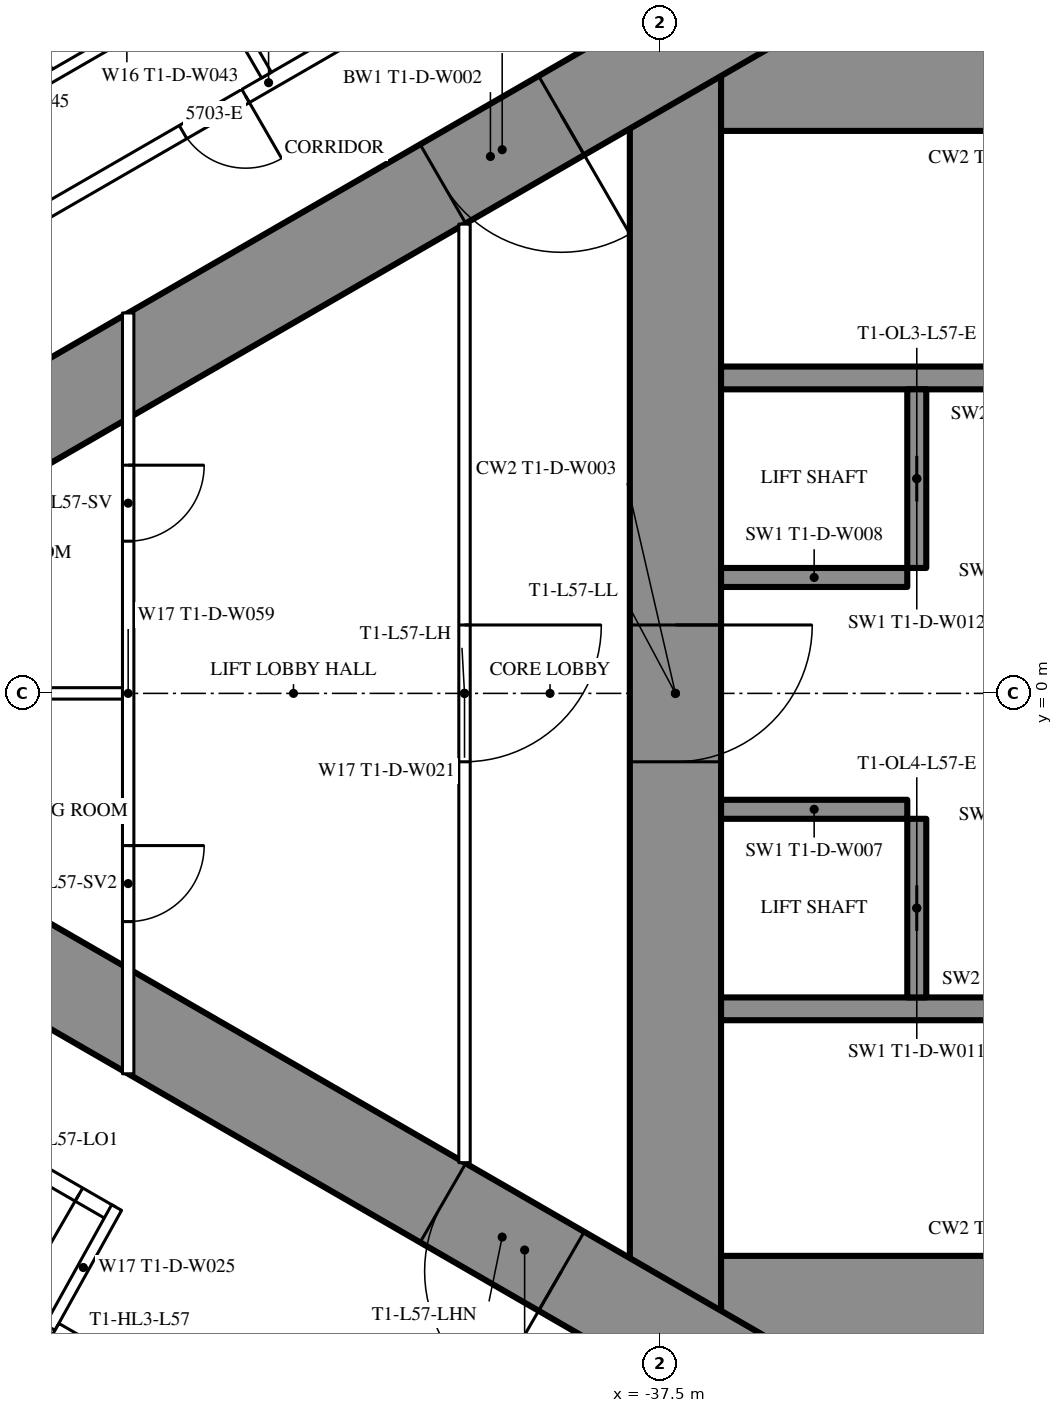
"""IFC4 building model, lengths in metres.
Left out: names, types, materials, properties, quantities, classifications, styles, units other than length and angle.
Written with IfcOpenShell. Run it as: python <this file> out.ifc"""

import sys

from ifc_helpers import new_model, si_unit, direction, frame, frame_2d, origin, place, context, subcontext, project, spatial, rectangle, extrude, element, fill, save


model = new_model("IFC4")
c1 = context("Model", 3, precision=1e-05, world=origin(), true_north=direction((0.0, 1.0)))
c2 = subcontext(c1, "Body", "Model", "MODEL_VIEW")
j1 = project(units=[si_unit("LENGTHUNIT", "METRE"), si_unit("PLANEANGLEUNIT", "RADIAN")], contexts=[c1])
p1 = place(None, origin())
s1 = spatial("IfcSite", under=j1, at=p1, CompositionType="ELEMENT")
p2 = place(p1, origin())
s2 = spatial("IfcBuilding", under=s1, at=p2, CompositionType="ELEMENT")
p3 = place(p2, frame((0.0, 0.0, 215.3)))
s3 = spatial("IfcBuildingStorey", under=s2, at=p3, CompositionType="ELEMENT", Elevation=215.3)
p4 = place(p3, frame((-37.3, 8.6, 0.0), z_axis=(0.0, 0.0, 1.0), x_axis=(0.0, -1.0, 0.0)))
e1 = element("IfcWall", 1, at=p4, inside=s3, PredefinedType="SHEAR", context=c2, shape_type="SweptSolid", body=[
    extrude(rectangle(XDim=17.2, YDim=1.2, at=frame_2d((8.6, 0.0))), origin(), (0.0, 0.0, 1.0), 3.6),
])
p5 = place(p4, frame((7.7, 0.0, 0.0)))
e2 = element("IfcOpeningElement", 2, at=p5, cuts=e1, PredefinedType="OPENING", context=c2, shape_type="SweptSolid", body=[
    extrude(rectangle(XDim=1.8, YDim=2.2, at=frame_2d((0.9, 1.1))), frame((0.0, 0.61, 0.0), z_axis=(0.0, -1.0, 0.0), x_axis=(1.0, 0.0, 0.0)), (0.0, 0.0, 1.0), 1.22),
])
p6 = place(p3, frame((-28.3, 8.0, 0.0), z_axis=(0.0, 0.0, 1.0), x_axis=(-1.0, 0.0, 0.0)))
e3 = element("IfcWall", 3, at=p6, inside=s3, PredefinedType="SHEAR", context=c2, shape_type="SweptSolid", body=[
    extrude(rectangle(XDim=8.4, YDim=1.2, at=frame_2d((4.2, 0.0))), origin(), (0.0, 0.0, 1.0), 3.6),
])
p7 = place(p6, frame((0.25, 0.0, 0.0)))
e4 = element("IfcOpeningElement", 4, at=p7, cuts=e3, PredefinedType="OPENING", context=c2, shape_type="SweptSolid", body=[
    extrude(rectangle(XDim=1.0, YDim=2.2, at=frame_2d((0.5, 1.1))), frame((0.0, 0.61, 0.0), z_axis=(0.0, -1.0, 0.0), x_axis=(1.0, 0.0, 0.0)), (0.0, 0.0, 1.0), 1.22),
])
p8 = place(p3, frame((-28.3, -8.0, 0.0), z_axis=(0.0, 0.0, 1.0), x_axis=(-1.0, 0.0, 0.0)))
e5 = element("IfcWall", 5, at=p8, inside=s3, PredefinedType="SHEAR", context=c2, shape_type="SweptSolid", body=[
    extrude(rectangle(XDim=8.4, YDim=1.2, at=frame_2d((4.2, 0.0))), origin(), (0.0, 0.0, 1.0), 3.6),
])
p9 = place(p8, frame((0.25, 0.0, 0.0)))
e6 = element("IfcOpeningElement", 6, at=p9, cuts=e5, PredefinedType="OPENING", context=c2, shape_type="SweptSolid", body=[
    extrude(rectangle(XDim=1.0, YDim=2.2, at=frame_2d((0.5, 1.1))), frame((0.0, 0.61, 0.0), z_axis=(0.0, -1.0, 0.0), x_axis=(1.0, 0.0, 0.0)), (0.0, 0.0, 1.0), 1.22),
])
for number, where, z_axis, x_axis in (
    (7, (-28.3, 4.15, 0.0), (0.0, 0.0, 1.0), (-1.0, 0.0, 0.0)),
    (8, (-28.3, -4.15, 0.0), (0.0, 0.0, 1.0), (-1.0, 0.0, 0.0)),
):
    element("IfcWall", number, at=place(p3, frame(where, z_axis=z_axis, x_axis=x_axis)), inside=s3, PredefinedType="SHEAR", context=c2, shape_type="SweptSolid", body=[
        extrude(rectangle(XDim=8.4, YDim=0.3, at=frame_2d((4.2, 0.0))), origin(), (0.0, 0.0, 1.0), 3.6),
    ])
p10 = place(p3, frame((-34.125, 4.0, 0.0), z_axis=(0.0, 0.0, 1.0), x_axis=(0.0, -1.0, 0.0)))
e9 = element("IfcWall", 9, at=p10, inside=s3, PredefinedType="SHEAR", context=c2, shape_type="SweptSolid", body=[
    extrude(rectangle(XDim=2.35, YDim=0.25, at=frame_2d((1.175, 0.0))), origin(), (0.0, 0.0, 1.0), 3.6),
])
p11 = place(p10, frame((0.875, 0.0, 0.0)))
e10 = element("IfcOpeningElement", 10, at=p11, cuts=e9, PredefinedType="OPENING", context=c2, shape_type="SweptSolid", body=[
    extrude(rectangle(XDim=0.6, YDim=2.0, at=frame_2d((0.3, 1.0))), frame((0.0, 0.135, 0.0), z_axis=(0.0, -1.0, 0.0), x_axis=(1.0, 0.0, 0.0)), (0.0, 0.0, 1.0), 0.27),
])
p12 = place(p3, frame((-34.25, 1.525, 0.0), z_axis=(0.0, 0.0, 1.0), x_axis=(-1.0, 0.0, 0.0)))
e11 = element("IfcWall", 11, at=p12, inside=s3, PredefinedType="SHEAR", context=c2, shape_type="SweptSolid", body=[
    extrude(rectangle(XDim=2.45, YDim=0.25, at=frame_2d((1.225, 0.0))), origin(), (0.0, 0.0, 1.0), 3.6),
])
p13 = place(p3, frame((-34.125, -1.65, 0.0), z_axis=(0.0, 0.0, 1.0), x_axis=(0.0, -1.0, 0.0)))
e12 = element("IfcWall", 12, at=p13, inside=s3, PredefinedType="SHEAR", context=c2, shape_type="SweptSolid", body=[
    extrude(rectangle(XDim=2.35, YDim=0.25, at=frame_2d((1.175, 0.0))), origin(), (0.0, 0.0, 1.0), 3.6),
])
p14 = place(p13, frame((0.875, 0.0, 0.0)))
e13 = element("IfcOpeningElement", 13, at=p14, cuts=e12, PredefinedType="OPENING", context=c2, shape_type="SweptSolid", body=[
    extrude(rectangle(XDim=0.6, YDim=2.0, at=frame_2d((0.3, 1.0))), frame((0.0, 0.135, 0.0), z_axis=(0.0, -1.0, 0.0), x_axis=(1.0, 0.0, 0.0)), (0.0, 0.0, 1.0), 0.27),
])
p15 = place(p3, frame((-34.25, -1.525, 0.0), z_axis=(0.0, 0.0, 1.0), x_axis=(-1.0, 0.0, 0.0)))
e14 = element("IfcWall", 14, at=p15, inside=s3, PredefinedType="SHEAR", context=c2, shape_type="SweptSolid", body=[
    extrude(rectangle(XDim=2.45, YDim=0.25, at=frame_2d((1.225, 0.0))), origin(), (0.0, 0.0, 1.0), 3.6),
])
p16 = place(p3, frame((-27.2, 14.3, 0.0), z_axis=(0.0, 0.0, 1.0), x_axis=(-0.866026593062, -0.499997940104, 0.0)))
e15 = element("IfcWall", 15, at=p16, inside=s3, PredefinedType="SHEAR", context=c2, shape_type="SweptSolid", body=[
    extrude(rectangle(XDim=28.946, YDim=1.2, at=frame_2d((14.473, 0.0))), origin(), (0.0, 0.0, 1.0), 3.6),
])
p17 = place(p16, frame((4.6, 0.0, 0.0)))
e16 = element("IfcOpeningElement", 16, at=p17, cuts=e15, PredefinedType="OPENING", context=c2, shape_type="SweptSolid", body=[
    extrude(rectangle(XDim=1.0, YDim=2.2, at=frame_2d((0.5, 1.1))), frame((0.0, 0.61, 0.0), z_axis=(0.0, -1.0, 0.0), x_axis=(1.0, 0.0, 0.0)), (0.0, 0.0, 1.0), 1.22),
])
p18 = place(p16, frame((13.395, 0.0, 0.0)))
e17 = element("IfcOpeningElement", 17, at=p18, cuts=e15, PredefinedType="OPENING", context=c2, shape_type="SweptSolid", body=[
    extrude(rectangle(XDim=1.8, YDim=2.2, at=frame_2d((0.9, 1.1))), frame((0.0, 0.61, 0.0), z_axis=(0.0, -1.0, 0.0), x_axis=(1.0, 0.0, 0.0)), (0.0, 0.0, 1.0), 1.22),
])
p19 = place(p3, frame((-27.2, -14.3, 0.0), z_axis=(0.0, 0.0, 1.0), x_axis=(-0.866024021859, 0.500002393557, 0.0)))
e18 = element("IfcWall", 18, at=p19, inside=s3, PredefinedType="SHEAR", context=c2, shape_type="SweptSolid", body=[
    extrude(rectangle(XDim=27.907, YDim=1.2, at=frame_2d((13.954, 0.0))), origin(), (0.0, 0.0, 1.0), 3.6),
])
p20 = place(p19, frame((4.6, 0.0, 0.0)))
e19 = element("IfcOpeningElement", 19, at=p20, cuts=e18, PredefinedType="OPENING", context=c2, shape_type="SweptSolid", body=[
    extrude(rectangle(XDim=1.0, YDim=2.2, at=frame_2d((0.5, 1.1))), frame((0.0, 0.61, 0.0), z_axis=(0.0, -1.0, 0.0), x_axis=(1.0, 0.0, 0.0)), (0.0, 0.0, 1.0), 1.22),
])
p21 = place(p19, frame((13.395, 0.0, 0.0)))
e20 = element("IfcOpeningElement", 20, at=p21, cuts=e18, PredefinedType="OPENING", context=c2, shape_type="SweptSolid", body=[
    extrude(rectangle(XDim=1.8, YDim=2.2, at=frame_2d((0.9, 1.1))), frame((0.0, 0.61, 0.0), z_axis=(0.0, -1.0, 0.0), x_axis=(1.0, 0.0, 0.0)), (0.0, 0.0, 1.0), 1.22),
])
p22 = place(p3, frame((-28.737, 16.068, 0.0), z_axis=(0.0, 0.0, 1.0), x_axis=(-0.866026057212, -0.499998868229, 0.0)))
e21 = element("IfcWall", 21, at=p22, inside=s3, PredefinedType="PARTITIONING", context=c2, shape_type="SweptSolid", body=[
    extrude(rectangle(XDim=32.137, YDim=0.2, at=frame_2d((16.068, 0.0))), origin(), (0.0, 0.0, 1.0), 3.35),
])
p23 = place(p22, frame((1.08, 0.0, 0.0)))
e22 = element("IfcOpeningElement", 22, at=p23, cuts=e21, PredefinedType="OPENING", context=c2, shape_type="SweptSolid", body=[
    extrude(rectangle(XDim=1.8, YDim=2.03, at=frame_2d((0.9, 1.015))), frame((0.0, 0.11, 0.0), z_axis=(0.0, -1.0, 0.0), x_axis=(1.0, 0.0, 0.0)), (0.0, 0.0, 1.0), 0.22),
])
p24 = place(p22, frame((6.86, 0.0, 0.0)))
e23 = element("IfcOpeningElement", 23, at=p24, cuts=e21, PredefinedType="OPENING", context=c2, shape_type="SweptSolid", body=[
    extrude(rectangle(XDim=1.0, YDim=2.2, at=frame_2d((0.5, 1.1))), frame((0.0, 0.11, 0.0), z_axis=(0.0, -1.0, 0.0), x_axis=(1.0, 0.0, 0.0)), (0.0, 0.0, 1.0), 0.22),
])
p25 = place(p22, frame((16.418, 0.0, 0.0)))
e24 = element("IfcOpeningElement", 24, at=p25, cuts=e21, PredefinedType="OPENING", context=c2, shape_type="SweptSolid", body=[
    extrude(rectangle(XDim=0.95, YDim=2.2, at=frame_2d((0.475, 1.1))), frame((0.0, 0.11, 0.0), z_axis=(0.0, -1.0, 0.0), x_axis=(1.0, 0.0, 0.0)), (0.0, 0.0, 1.0), 0.22),
])
p26 = place(p22, frame((20.567, 0.0, 0.0)))
e25 = element("IfcOpeningElement", 25, at=p26, cuts=e21, PredefinedType="OPENING", context=c2, shape_type="SweptSolid", body=[
    extrude(rectangle(XDim=0.95, YDim=2.2, at=frame_2d((0.475, 1.1))), frame((0.0, 0.11, 0.0), z_axis=(0.0, -1.0, 0.0), x_axis=(1.0, 0.0, 0.0)), (0.0, 0.0, 1.0), 0.22),
])
p27 = place(p22, frame((27.065, 0.0, 0.0)))
e26 = element("IfcOpeningElement", 26, at=p27, cuts=e21, PredefinedType="OPENING", context=c2, shape_type="SweptSolid", body=[
    extrude(rectangle(XDim=0.95, YDim=2.2, at=frame_2d((0.475, 1.1))), frame((0.0, 0.11, 0.0), z_axis=(0.0, -1.0, 0.0), x_axis=(1.0, 0.0, 0.0)), (0.0, 0.0, 1.0), 0.22),
])
p28 = place(p3, frame((-42.68, 8.134, 0.0), z_axis=(0.0, 0.0, 1.0), x_axis=(-0.499984479505, 0.866034364361, 0.0)))
e27 = element("IfcWall", 27, at=p28, inside=s3, PredefinedType="PARTITIONING", context=c2, shape_type="SweptSolid", body=[
    extrude(rectangle(XDim=5.995, YDim=0.15, at=frame_2d((2.998, 0.0))), origin(), (0.0, 0.0, 1.0), 2.45),
])
p29 = place(p3, frame((-44.715, -6.844, 0.0), z_axis=(0.0, 0.0, 1.0), x_axis=(-0.866025261224, 0.500000246922, 0.0)))
e28 = element("IfcWall", 28, at=p29, inside=s3, PredefinedType="PARTITIONING", context=c2, shape_type="SweptSolid", body=[
    extrude(rectangle(XDim=13.567, YDim=0.2, at=frame_2d((6.783, 0.0))), origin(), (0.0, 0.0, 1.0), 3.35),
])
p30 = place(p29, frame((9.667, 0.0, 0.0)))
e29 = element("IfcOpeningElement", 29, at=p30, cuts=e28, PredefinedType="OPENING", context=c2, shape_type="SweptSolid", body=[
    extrude(rectangle(XDim=0.95, YDim=2.2, at=frame_2d((0.475, 1.1))), frame((0.0, 0.11, 0.0), z_axis=(0.0, -1.0, 0.0), x_axis=(1.0, 0.0, 0.0)), (0.0, 0.0, 1.0), 0.22),
])
p31 = place(p29, frame((2.117, 0.0, 0.0)))
e30 = element("IfcOpeningElement", 30, at=p31, cuts=e28, PredefinedType="OPENING", context=c2, shape_type="SweptSolid", body=[
    extrude(rectangle(XDim=0.95, YDim=2.2, at=frame_2d((0.475, 1.1))), frame((0.0, 0.11, 0.0), z_axis=(0.0, -1.0, 0.0), x_axis=(1.0, 0.0, 0.0)), (0.0, 0.0, 1.0), 0.22),
])
p32 = place(p29, frame((0.5, 0.0, 0.0)))
e31 = element("IfcOpeningElement", 31, at=p32, cuts=e28, PredefinedType="OPENING", context=c2, shape_type="SweptSolid", body=[
    extrude(rectangle(XDim=0.967, YDim=2.2, at=frame_2d((0.483, 1.1))), frame((0.0, 0.11, 0.0), z_axis=(0.0, -1.0, 0.0), x_axis=(1.0, 0.0, 0.0)), (0.0, 0.0, 1.0), 0.22),
])
p33 = place(p3, frame((-44.652, -6.764, 0.0), z_axis=(0.0, 0.0, 1.0), x_axis=(-0.485424724123, -0.874278466629, 0.0)))
e32 = element("IfcWall", 32, at=p33, inside=s3, PredefinedType="PARTITIONING", context=c2, shape_type="SweptSolid", body=[
    extrude(rectangle(XDim=1.805, YDim=0.15, at=frame_2d((0.903, 0.0))), origin(), (0.0, 0.0, 1.0), 3.35),
])
p34 = place(p3, frame((-45.524, 8.109, 0.0), z_axis=(0.0, 0.0, 1.0), x_axis=(-0.49997716683, 0.86603858612, 0.0)))
e33 = element("IfcWall", 33, at=p34, inside=s3, PredefinedType="PARTITIONING", context=c2, shape_type="SweptSolid", body=[
    extrude(rectangle(XDim=2.6, YDim=0.15, at=frame_2d((1.3, 0.0))), origin(), (0.0, 0.0, 1.0), 3.35),
])
p35 = place(p34, frame((0.9, 0.0, 0.0)))
e34 = element("IfcOpeningElement", 34, at=p35, cuts=e33, PredefinedType="OPENING", context=c2, shape_type="SweptSolid", body=[
    extrude(rectangle(XDim=0.8, YDim=2.2, at=frame_2d((0.4, 1.1))), frame((0.0, 0.085, 0.0), z_axis=(0.0, -1.0, 0.0), x_axis=(1.0, 0.0, 0.0)), (0.0, 0.0, 1.0), 0.17),
])
p36 = place(p3, frame((-43.445, 9.309, 0.0), z_axis=(0.0, 0.0, 1.0), x_axis=(-0.866031185235, -0.4999899861, 0.0)))
e35 = element("IfcWall", 35, at=p36, inside=s3, PredefinedType="PARTITIONING", context=c2, shape_type="SweptSolid", body=[
    extrude(rectangle(XDim=2.475, YDim=0.15, at=frame_2d((1.238, 0.0))), origin(), (0.0, 0.0, 1.0), 3.35),
])
p37 = place(p3, frame((-40.075, 6.174, 0.0), z_axis=(0.0, 0.0, 1.0), x_axis=(0.0, -1.0, 0.0)))
e36 = element("IfcWall", 36, at=p37, inside=s3, PredefinedType="PARTITIONING", context=c2, shape_type="SweptSolid", body=[
    extrude(rectangle(XDim=12.348, YDim=0.15, at=frame_2d((6.174, 0.0))), origin(), (0.0, 0.0, 1.0), 3.35),
])
p38 = place(p37, frame((5.274, 0.0, 0.0)))
e37 = element("IfcOpeningElement", 37, at=p38, cuts=e36, PredefinedType="OPENING", context=c2, shape_type="SweptSolid", body=[
    extrude(rectangle(XDim=1.8, YDim=2.2, at=frame_2d((0.9, 1.1))), frame((0.0, 0.085, 0.0), z_axis=(0.0, -1.0, 0.0), x_axis=(1.0, 0.0, 0.0)), (0.0, 0.0, 1.0), 0.17),
])
p39 = place(p3, frame((-44.5, 5.005, 0.0), z_axis=(0.0, 0.0, 1.0), x_axis=(0.0, -1.0, 0.0)))
e38 = element("IfcWall", 38, at=p39, inside=s3, PredefinedType="PARTITIONING", context=c2, shape_type="SweptSolid", body=[
    extrude(rectangle(XDim=10.009, YDim=0.15, at=frame_2d((5.005, 0.0))), origin(), (0.0, 0.0, 1.0), 2.5),
])
p40 = place(p39, frame((2.002, 0.0, 0.0)))
e39 = element("IfcOpeningElement", 39, at=p40, cuts=e38, PredefinedType="OPENING", context=c2, shape_type="SweptSolid", body=[
    extrude(rectangle(XDim=1.0, YDim=2.2, at=frame_2d((0.5, 1.1))), frame((0.0, 0.085, 0.0), z_axis=(0.0, -1.0, 0.0), x_axis=(1.0, 0.0, 0.0)), (0.0, 0.0, 1.0), 0.17),
])
p41 = place(p39, frame((7.007, 0.0, 0.0)))
e40 = element("IfcOpeningElement", 40, at=p41, cuts=e38, PredefinedType="OPENING", context=c2, shape_type="SweptSolid", body=[
    extrude(rectangle(XDim=1.0, YDim=2.2, at=frame_2d((0.5, 1.1))), frame((0.0, 0.085, 0.0), z_axis=(0.0, -1.0, 0.0), x_axis=(1.0, 0.0, 0.0)), (0.0, 0.0, 1.0), 0.17),
])
p42 = place(p3, frame((-44.575, 0.0, 0.0), z_axis=(0.0, 0.0, 1.0), x_axis=(-1.0, 0.0, 0.0)))
e41 = element("IfcWall", 41, at=p42, inside=s3, PredefinedType="PARTITIONING", context=c2, shape_type="SweptSolid", body=[
    extrude(rectangle(XDim=8.593, YDim=0.15, at=frame_2d((4.297, 0.0))), origin(), (0.0, 0.0, 1.0), 2.45),
])
p43 = place(p3, frame((-39.758, -11.697, 0.0), z_axis=(0.0, 0.0, 1.0), x_axis=(-0.866024194504, 0.500002094529, 0.0)))
e42 = element("IfcWall", 42, at=p43, inside=s3, PredefinedType="PARTITIONING", context=c2, shape_type="SweptSolid", body=[
    extrude(rectangle(XDim=6.6, YDim=0.25, at=frame_2d((3.3, 0.0))), origin(), (0.0, 0.0, 1.0), 3.35),
])
p44 = place(p43, frame((0.75, 0.0, 0.0)))
e43 = element("IfcOpeningElement", 43, at=p44, cuts=e42, PredefinedType="OPENING", context=c2, shape_type="SweptSolid", body=[
    extrude(rectangle(XDim=1.1, YDim=2.2, at=frame_2d((0.55, 1.1))), frame((0.0, 0.135, 0.0), z_axis=(0.0, -1.0, 0.0), x_axis=(1.0, 0.0, 0.0)), (0.0, 0.0, 1.0), 0.27),
])
p45 = place(p43, frame((2.75, 0.0, 0.0)))
e44 = element("IfcOpeningElement", 44, at=p45, cuts=e42, PredefinedType="OPENING", context=c2, shape_type="SweptSolid", body=[
    extrude(rectangle(XDim=1.1, YDim=2.2, at=frame_2d((0.55, 1.1))), frame((0.0, 0.135, 0.0), z_axis=(0.0, -1.0, 0.0), x_axis=(1.0, 0.0, 0.0)), (0.0, 0.0, 1.0), 0.27),
])
p46 = place(p43, frame((4.75, 0.0, 0.0)))
e45 = element("IfcOpeningElement", 45, at=p46, cuts=e42, PredefinedType="OPENING", context=c2, shape_type="SweptSolid", body=[
    extrude(rectangle(XDim=1.1, YDim=2.2, at=frame_2d((0.55, 1.1))), frame((0.0, 0.135, 0.0), z_axis=(0.0, -1.0, 0.0), x_axis=(1.0, 0.0, 0.0)), (0.0, 0.0, 1.0), 0.27),
])
p47 = place(p25, origin())
e46 = element("IfcDoor", 46, at=p47, inside=s3, OperationType="SINGLE_SWING_LEFT", PredefinedType="DOOR", context=c2, shape_type="SweptSolid", body=[
    extrude(rectangle(XDim=0.95, YDim=2.2, at=frame_2d((0.475, 1.1))), frame((0.0, 0.025, 0.0), z_axis=(0.0, -1.0, 0.0), x_axis=(1.0, 0.0, 0.0)), (0.0, 0.0, 1.0), 0.05),
])
fill(e24, e46)
p48 = place(p32, origin())
e47 = element("IfcDoor", 47, at=p48, inside=s3, OperationType="SINGLE_SWING_LEFT", PredefinedType="DOOR", context=c2, shape_type="SweptSolid", body=[
    extrude(rectangle(XDim=0.967, YDim=2.2, at=frame_2d((0.483, 1.1))), frame((0.0, 0.025, 0.0), z_axis=(0.0, -1.0, 0.0), x_axis=(1.0, 0.0, 0.0)), (0.0, 0.0, 1.0), 0.05),
])
fill(e31, e47)
p49 = place(p38, origin())
e48 = element("IfcDoor", 48, at=p49, inside=s3, OperationType="DOUBLE_DOOR_SINGLE_SWING", PredefinedType="DOOR", context=c2, shape_type="SweptSolid", body=[
    extrude(rectangle(XDim=1.8, YDim=2.2, at=frame_2d((0.9, 1.1))), frame((0.0, 0.025, 0.0), z_axis=(0.0, -1.0, 0.0), x_axis=(1.0, 0.0, 0.0)), (0.0, 0.0, 1.0), 0.05),
])
fill(e37, e48)
p50 = place(p40, origin())
e49 = element("IfcDoor", 49, at=p50, inside=s3, OperationType="SINGLE_SWING_LEFT", PredefinedType="DOOR", context=c2, shape_type="SweptSolid", body=[
    extrude(rectangle(XDim=1.0, YDim=2.2, at=frame_2d((0.5, 1.1))), frame((0.0, 0.025, 0.0), z_axis=(0.0, -1.0, 0.0), x_axis=(1.0, 0.0, 0.0)), (0.0, 0.0, 1.0), 0.05),
])
fill(e39, e49)
p51 = place(p41, origin())
e50 = element("IfcDoor", 50, at=p51, inside=s3, OperationType="SINGLE_SWING_LEFT", PredefinedType="DOOR", context=c2, shape_type="SweptSolid", body=[
    extrude(rectangle(XDim=1.0, YDim=2.2, at=frame_2d((0.5, 1.1))), frame((0.0, 0.025, 0.0), z_axis=(0.0, -1.0, 0.0), x_axis=(1.0, 0.0, 0.0)), (0.0, 0.0, 1.0), 0.05),
])
fill(e40, e50)
p52 = place(p18, origin())
e51 = element("IfcDoor", 51, at=p52, inside=s3, OperationType="DOUBLE_DOOR_SINGLE_SWING", PredefinedType="DOOR", context=c2, shape_type="SweptSolid", body=[
    extrude(rectangle(XDim=1.8, YDim=2.2, at=frame_2d((0.9, 1.1))), frame((0.0, 0.025, 0.0), z_axis=(0.0, -1.0, 0.0), x_axis=(1.0, 0.0, 0.0)), (0.0, 0.0, 1.0), 0.05),
])
fill(e17, e51)
p53 = place(p21, origin())
e52 = element("IfcDoor", 52, at=p53, inside=s3, OperationType="DOUBLE_DOOR_SINGLE_SWING", PredefinedType="DOOR", context=c2, shape_type="SweptSolid", body=[
    extrude(rectangle(XDim=1.8, YDim=2.2, at=frame_2d((0.9, 1.1))), frame((0.0, 0.025, 0.0), z_axis=(0.0, -1.0, 0.0), x_axis=(1.0, 0.0, 0.0)), (0.0, 0.0, 1.0), 0.05),
])
fill(e20, e52)
p54 = place(p5, origin())
e53 = element("IfcDoor", 53, at=p54, inside=s3, OperationType="DOUBLE_DOOR_SINGLE_SWING", PredefinedType="DOOR", context=c2, shape_type="SweptSolid", body=[
    extrude(rectangle(XDim=1.8, YDim=2.2, at=frame_2d((0.9, 1.1))), frame((0.0, 0.025, 0.0), z_axis=(0.0, -1.0, 0.0), x_axis=(1.0, 0.0, 0.0)), (0.0, 0.0, 1.0), 0.05),
])
fill(e2, e53)
p55 = place(p11, origin())
e54 = element("IfcDoor", 54, at=p55, inside=s3, OperationType="SLIDING_TO_LEFT", PredefinedType="DOOR", context=c2, shape_type="SweptSolid", body=[
    extrude(rectangle(XDim=0.6, YDim=2.0, at=frame_2d((0.3, 1.0))), frame((0.0, 0.025, 0.0), z_axis=(0.0, -1.0, 0.0), x_axis=(1.0, 0.0, 0.0)), (0.0, 0.0, 1.0), 0.05),
])
fill(e10, e54)
p56 = place(p14, origin())
e55 = element("IfcDoor", 55, at=p56, inside=s3, OperationType="SLIDING_TO_LEFT", PredefinedType="DOOR", context=c2, shape_type="SweptSolid", body=[
    extrude(rectangle(XDim=0.6, YDim=2.0, at=frame_2d((0.3, 1.0))), frame((0.0, 0.025, 0.0), z_axis=(0.0, -1.0, 0.0), x_axis=(1.0, 0.0, 0.0)), (0.0, 0.0, 1.0), 0.05),
])
fill(e13, e55)
save(model, sys.argv[1])
